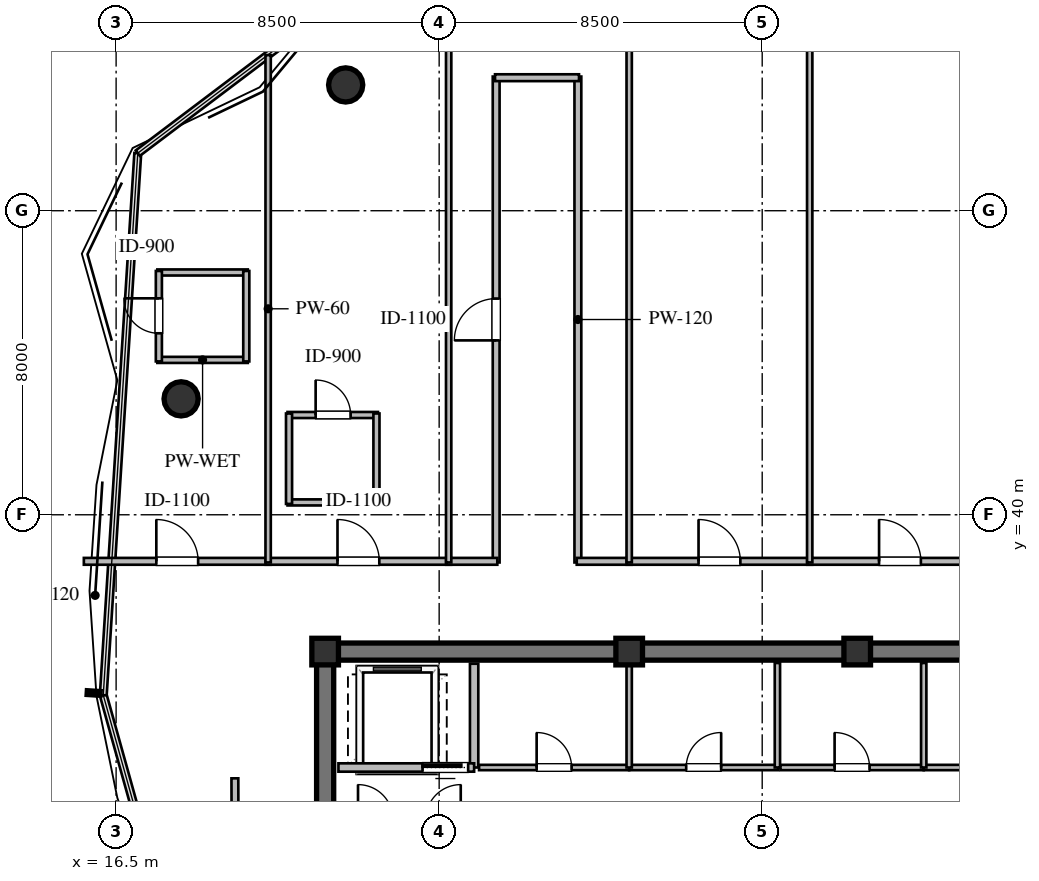
"""IFC4 building model, lengths in metres.
Left out: names, types, materials, properties, quantities, classifications, styles, units other than length and angle.
Written with IfcOpenShell. Run it as: python <this file> out.ifc"""

import sys

from ifc_helpers import new_model, si_unit, direction, frame, frame_2d, origin, origin_2d, place, context, subcontext, project, spatial, rectangle, circle, extrude, element, fill, save


model = new_model("IFC4")
c1 = context("Model", 3, precision=1e-05, world=origin(), true_north=direction((0.0, 1.0)))
c2 = subcontext(c1, "Body", "Model", "MODEL_VIEW")
j1 = project(units=[si_unit("LENGTHUNIT", "METRE"), si_unit("PLANEANGLEUNIT", "RADIAN")], contexts=[c1])
p1 = place(None, origin())
s1 = spatial("IfcSite", under=j1, at=p1, CompositionType="ELEMENT")
p2 = place(p1, origin())
s2 = spatial("IfcBuilding", under=s1, at=p2, CompositionType="ELEMENT")
p3 = place(p2, frame((0.0, 0.0, 262.4)))
s3 = spatial("IfcBuildingStorey", under=s2, at=p3, CompositionType="ELEMENT", Elevation=262.4)
p4 = place(p3, frame((21.775, 36.4, 0.0), z_axis=(0.0, 0.0, 1.0), x_axis=(1.0, 0.0, 0.0)))
e1 = element("IfcWall", 1, at=p4, inside=s3, PredefinedType="SHEAR", context=c2, shape_type="SweptSolid", body=[
    extrude(rectangle(XDim=22.45, YDim=0.45, at=frame_2d((11.225, 0.0))), origin(), (0.0, 0.0, 1.0), 3.56),
])
p5 = place(p3, frame((22.0, 23.825, 0.0), z_axis=(0.0, 0.0, 1.0), x_axis=(0.0, 1.0, 0.0)))
e2 = element("IfcWall", 2, at=p5, inside=s3, PredefinedType="SHEAR", context=c2, shape_type="SweptSolid", body=[
    extrude(rectangle(XDim=12.35, YDim=0.45, at=frame_2d((6.175, 0.0))), origin(), (0.0, 0.0, 1.0), 3.56),
])
for number, where, z_axis, x_axis in (
    (3, (36.0, 36.4, 0.0), (0.0, 0.0, 1.0), (1.0, 0.0, 0.0)),
    (4, (30.0, 36.4, 0.0), (0.0, 0.0, 1.0), (1.0, 0.0, 0.0)),
    (5, (22.0, 36.4, 0.0), (0.0, 0.0, 1.0), (1.0, 0.0, 0.0)),
):
    element("IfcColumn", number, at=place(p3, frame(where, z_axis=z_axis, x_axis=x_axis)), inside=s3, PredefinedType="COLUMN", context=c2, shape_type="SweptSolid", body=[
        extrude(rectangle(XDim=0.7, YDim=0.7, at=origin_2d()), origin(), (0.0, 0.0, 1.0), 3.8),
    ])
for number, where, z_axis, x_axis in (
    (6, (22.54, 51.31, 0.0), (0.0, 0.0, 1.0), (1.0, 0.0, 0.0)),
    (7, (18.21, 43.05, 0.0), (0.0, 0.0, 1.0), (1.0, 0.0, 0.0)),
):
    element("IfcColumn", number, at=place(p3, frame(where, z_axis=z_axis, x_axis=x_axis)), inside=s3, PredefinedType="COLUMN", context=c2, shape_type="SweptSolid", body=[
        extrude(circle(Radius=0.45, at=origin_2d()), origin(), (0.0, 0.0, 1.0), 3.8),
    ])
p6 = place(p3, frame((25.92, 33.35, 0.0), z_axis=(0.0, 0.0, 1.0), x_axis=(0.0, 1.0, 0.0)))
e8 = element("IfcWall", 8, at=p6, inside=s3, PredefinedType="SOLIDWALL", context=c2, shape_type="SweptSolid", body=[
    extrude(rectangle(XDim=2.73, YDim=0.22, at=frame_2d((1.365, 0.0))), origin(), (0.0, 0.0, 1.0), 3.56),
])
p7 = place(p3, frame((22.35, 33.35, 0.0), z_axis=(0.0, 0.0, 1.0), x_axis=(1.0, 0.0, 0.0)))
e9 = element("IfcWall", 9, at=p7, inside=s3, PredefinedType="SOLIDWALL", context=c2, shape_type="SweptSolid", body=[
    extrude(rectangle(XDim=3.57, YDim=0.22, at=frame_2d((1.785, 0.0))), origin(), (0.0, 0.0, 1.0), 3.56),
])
p8 = place(p7, frame((2.213, 0.0, 0.0)))
e10 = element("IfcOpeningElement", 10, at=p8, cuts=e9, PredefinedType="OPENING", context=c2, shape_type="SweptSolid", body=[
    extrude(rectangle(XDim=1.2, YDim=2.1, at=frame_2d((0.6, 1.05))), frame((0.0, 0.12, 0.0), z_axis=(0.0, -1.0, 0.0), x_axis=(1.0, 0.0, 0.0)), (0.0, 0.0, 1.0), 0.24),
])
p9 = place(p3, frame((26.05, 33.35, 0.0), z_axis=(0.0, 0.0, 1.0), x_axis=(1.0, 0.0, 0.0)))
e11 = element("IfcWall", 11, at=p9, inside=s3, PredefinedType="PARTITIONING", context=c2, shape_type="SweptSolid", body=[
    extrude(rectangle(XDim=3.95, YDim=0.14, at=frame_2d((1.975, 0.0))), origin(), (0.0, 0.0, 1.0), 3.56),
])
p10 = place(p9, frame((1.515, 0.0, 0.0)))
e12 = element("IfcOpeningElement", 12, at=p10, cuts=e11, PredefinedType="OPENING", context=c2, shape_type="SweptSolid", body=[
    extrude(rectangle(XDim=0.92, YDim=2.1, at=frame_2d((0.46, 1.05))), frame((0.0, 0.08, 0.0), z_axis=(0.0, -1.0, 0.0), x_axis=(1.0, 0.0, 0.0)), (0.0, 0.0, 1.0), 0.16),
])
p11 = place(p3, frame((30.0, 33.35, 0.0), z_axis=(0.0, 0.0, 1.0), x_axis=(1.0, 0.0, 0.0)))
e13 = element("IfcWall", 13, at=p11, inside=s3, PredefinedType="PARTITIONING", context=c2, shape_type="SweptSolid", body=[
    extrude(rectangle(XDim=3.92, YDim=0.14, at=frame_2d((1.96, 0.0))), origin(), (0.0, 0.0, 1.0), 3.56),
])
p12 = place(p11, frame((1.5, 0.0, 0.0)))
e14 = element("IfcOpeningElement", 14, at=p12, cuts=e13, PredefinedType="OPENING", context=c2, shape_type="SweptSolid", body=[
    extrude(rectangle(XDim=0.92, YDim=2.1, at=frame_2d((0.46, 1.05))), frame((0.0, 0.08, 0.0), z_axis=(0.0, -1.0, 0.0), x_axis=(1.0, 0.0, 0.0)), (0.0, 0.0, 1.0), 0.16),
])
for number, where, z_axis, x_axis in (
    (15, (30.0, 33.35, 0.0), (0.0, 0.0, 1.0), (0.0, 1.0, 0.0)),
    (16, (33.9, 33.35, 0.0), (0.0, 0.0, 1.0), (0.0, 1.0, 0.0)),
):
    element("IfcWall", number, at=place(p3, frame(where, z_axis=z_axis, x_axis=x_axis)), inside=s3, PredefinedType="PARTITIONING", context=c2, shape_type="SweptSolid", body=[
        extrude(rectangle(XDim=2.75, YDim=0.14, at=frame_2d((1.375, 0.0))), origin(), (0.0, 0.0, 1.0), 3.56),
    ])
p13 = place(p3, frame((33.98, 33.35, 0.0), z_axis=(0.0, 0.0, 1.0), x_axis=(1.0, 0.0, 0.0)))
e17 = element("IfcWall", 17, at=p13, inside=s3, PredefinedType="PARTITIONING", context=c2, shape_type="SweptSolid", body=[
    extrude(rectangle(XDim=3.77, YDim=0.14, at=frame_2d((1.885, 0.0))), origin(), (0.0, 0.0, 1.0), 3.56),
])
p14 = place(p13, frame((1.425, 0.0, 0.0)))
e18 = element("IfcOpeningElement", 18, at=p14, cuts=e17, PredefinedType="OPENING", context=c2, shape_type="SweptSolid", body=[
    extrude(rectangle(XDim=0.92, YDim=2.1, at=frame_2d((0.46, 1.05))), frame((0.0, 0.08, 0.0), z_axis=(0.0, -1.0, 0.0), x_axis=(1.0, 0.0, 0.0)), (0.0, 0.0, 1.0), 0.16),
])
p15 = place(p3, frame((37.75, 33.35, 0.0), z_axis=(0.0, 0.0, 1.0), x_axis=(1.0, 0.0, 0.0)))
e19 = element("IfcWall", 19, at=p15, inside=s3, PredefinedType="PARTITIONING", context=c2, shape_type="SweptSolid", body=[
    extrude(rectangle(XDim=3.77, YDim=0.14, at=frame_2d((1.885, 0.0))), origin(), (0.0, 0.0, 1.0), 3.56),
])
p16 = place(p15, frame((1.425, 0.0, 0.0)))
e20 = element("IfcOpeningElement", 20, at=p16, cuts=e19, PredefinedType="OPENING", context=c2, shape_type="SweptSolid", body=[
    extrude(rectangle(XDim=0.92, YDim=2.1, at=frame_2d((0.46, 1.05))), frame((0.0, 0.08, 0.0), z_axis=(0.0, -1.0, 0.0), x_axis=(1.0, 0.0, 0.0)), (0.0, 0.0, 1.0), 0.16),
])
p17 = place(p3, frame((37.75, 33.35, 0.0), z_axis=(0.0, 0.0, 1.0), x_axis=(0.0, 1.0, 0.0)))
e21 = element("IfcWall", 21, at=p17, inside=s3, PredefinedType="PARTITIONING", context=c2, shape_type="SweptSolid", body=[
    extrude(rectangle(XDim=2.75, YDim=0.14, at=frame_2d((1.375, 0.0))), origin(), (0.0, 0.0, 1.0), 3.56),
])
for number, where, z_axis, x_axis in (
    (22, (17.585, 44.075, 0.0), (0.0, 0.0, 1.0), (1.0, 0.0, 0.0)),
    (23, (17.585, 46.375, 0.0), (0.0, 0.0, 1.0), (1.0, 0.0, 0.0)),
):
    element("IfcWall", number, at=place(p3, frame(where, z_axis=z_axis, x_axis=x_axis)), inside=s3, PredefinedType="PLUMBINGWALL", context=c2, shape_type="SweptSolid", body=[
        extrude(rectangle(XDim=2.38, YDim=0.16, at=frame_2d((1.19, 0.0))), origin(), (0.0, 0.0, 1.0), 3.56),
    ])
p18 = place(p3, frame((17.625, 44.035, 0.0), z_axis=(0.0, 0.0, 1.0), x_axis=(0.0, 1.0, 0.0)))
e24 = element("IfcWall", 24, at=p18, inside=s3, PredefinedType="PLUMBINGWALL", context=c2, shape_type="SweptSolid", body=[
    extrude(rectangle(XDim=2.38, YDim=0.16, at=frame_2d((1.19, 0.0))), origin(), (0.0, 0.0, 1.0), 3.56),
])
p19 = place(p18, frame((0.74, 0.0, 0.0)))
e25 = element("IfcOpeningElement", 25, at=p19, cuts=e24, PredefinedType="OPENING", context=c2, shape_type="SweptSolid", body=[
    extrude(rectangle(XDim=0.92, YDim=2.1, at=frame_2d((0.46, 1.05))), frame((0.0, 0.09, 0.0), z_axis=(0.0, -1.0, 0.0), x_axis=(1.0, 0.0, 0.0)), (0.0, 0.0, 1.0), 0.18),
])
p20 = place(p3, frame((19.925, 44.035, 0.0), z_axis=(0.0, 0.0, 1.0), x_axis=(0.0, 1.0, 0.0)))
e26 = element("IfcWall", 26, at=p20, inside=s3, PredefinedType="PLUMBINGWALL", context=c2, shape_type="SweptSolid", body=[
    extrude(rectangle(XDim=2.38, YDim=0.16, at=frame_2d((1.19, 0.0))), origin(), (0.0, 0.0, 1.0), 3.56),
])
p21 = place(p3, frame((21.01, 40.325, 0.0), z_axis=(0.0, 0.0, 1.0), x_axis=(1.0, 0.0, 0.0)))
e27 = element("IfcWall", 27, at=p21, inside=s3, PredefinedType="PLUMBINGWALL", context=c2, shape_type="SweptSolid", body=[
    extrude(rectangle(XDim=2.38, YDim=0.16, at=frame_2d((1.19, 0.0))), origin(), (0.0, 0.0, 1.0), 3.56),
])
p22 = place(p3, frame((21.01, 42.625, 0.0), z_axis=(0.0, 0.0, 1.0), x_axis=(1.0, 0.0, 0.0)))
e28 = element("IfcWall", 28, at=p22, inside=s3, PredefinedType="PLUMBINGWALL", context=c2, shape_type="SweptSolid", body=[
    extrude(rectangle(XDim=2.38, YDim=0.16, at=frame_2d((1.19, 0.0))), origin(), (0.0, 0.0, 1.0), 3.56),
])
p23 = place(p22, frame((0.74, 0.0, 0.0)))
e29 = element("IfcOpeningElement", 29, at=p23, cuts=e28, PredefinedType="OPENING", context=c2, shape_type="SweptSolid", body=[
    extrude(rectangle(XDim=0.92, YDim=2.1, at=frame_2d((0.46, 1.05))), frame((0.0, 0.09, 0.0), z_axis=(0.0, -1.0, 0.0), x_axis=(1.0, 0.0, 0.0)), (0.0, 0.0, 1.0), 0.18),
])
p24 = place(p3, frame((21.05, 40.285, 0.0), z_axis=(0.0, 0.0, 1.0), x_axis=(0.0, 1.0, 0.0)))
e30 = element("IfcWall", 30, at=p24, inside=s3, PredefinedType="PLUMBINGWALL", context=c2, shape_type="SweptSolid", body=[
    extrude(rectangle(XDim=2.38, YDim=0.16, at=frame_2d((1.19, 0.0))), origin(), (0.0, 0.0, 1.0), 3.56),
])
p25 = place(p3, frame((23.35, 40.285, 0.0), z_axis=(0.0, 0.0, 1.0), x_axis=(0.0, 1.0, 0.0)))
e31 = element("IfcWall", 31, at=p25, inside=s3, PredefinedType="PLUMBINGWALL", context=c2, shape_type="SweptSolid", body=[
    extrude(rectangle(XDim=2.38, YDim=0.16, at=frame_2d((1.19, 0.0))), origin(), (0.0, 0.0, 1.0), 3.09),
])
p26 = place(p3, frame((15.651, 38.775, 0.0), z_axis=(0.0, 0.0, 1.0), x_axis=(1.0, 0.0, 0.0)))
e32 = element("IfcWall", 32, at=p26, inside=s3, PredefinedType="PARTITIONING", context=c2, shape_type="SweptSolid", body=[
    extrude(rectangle(XDim=4.914, YDim=0.18, at=frame_2d((2.457, 0.0))), origin(), (0.0, 0.0, 1.0), 3.56),
])
p27 = place(p26, frame((1.907, 0.0, 0.0)))
e33 = element("IfcOpeningElement", 33, at=p27, cuts=e32, PredefinedType="OPENING", context=c2, shape_type="SweptSolid", body=[
    extrude(rectangle(XDim=1.1, YDim=2.1, at=frame_2d((0.55, 1.05))), frame((0.0, 0.1, 0.0), z_axis=(0.0, -1.0, 0.0), x_axis=(1.0, 0.0, 0.0)), (0.0, 0.0, 1.0), 0.2),
])
p28 = place(p3, frame((20.435, 38.775, 0.0), z_axis=(0.0, 0.0, 1.0), x_axis=(1.0, 0.0, 0.0)))
e34 = element("IfcWall", 34, at=p28, inside=s3, PredefinedType="PARTITIONING", context=c2, shape_type="SweptSolid", body=[
    extrude(rectangle(XDim=4.88, YDim=0.18, at=frame_2d((2.44, 0.0))), origin(), (0.0, 0.0, 1.0), 3.56),
])
p29 = place(p28, frame((1.89, 0.0, 0.0)))
e35 = element("IfcOpeningElement", 35, at=p29, cuts=e34, PredefinedType="OPENING", context=c2, shape_type="SweptSolid", body=[
    extrude(rectangle(XDim=1.1, YDim=2.1, at=frame_2d((0.55, 1.05))), frame((0.0, 0.1, 0.0), z_axis=(0.0, -1.0, 0.0), x_axis=(1.0, 0.0, 0.0)), (0.0, 0.0, 1.0), 0.2),
])
p30 = place(p3, frame((26.5, 38.745, 0.0), z_axis=(0.0, 0.0, 1.0), x_axis=(0.0, 1.0, 0.0)))
e36 = element("IfcWall", 36, at=p30, inside=s3, PredefinedType="PARTITIONING", context=c2, shape_type="SweptSolid", body=[
    extrude(rectangle(XDim=12.785, YDim=0.18, at=frame_2d((6.393, 0.0))), origin(), (0.0, 0.0, 1.0), 3.56),
])
p31 = place(p30, frame((5.843, 0.0, 0.0)))
e37 = element("IfcOpeningElement", 37, at=p31, cuts=e36, PredefinedType="OPENING", context=c2, shape_type="SweptSolid", body=[
    extrude(rectangle(XDim=1.1, YDim=2.1, at=frame_2d((0.55, 1.05))), frame((0.0, 0.1, 0.0), z_axis=(0.0, -1.0, 0.0), x_axis=(1.0, 0.0, 0.0)), (0.0, 0.0, 1.0), 0.2),
])
p32 = place(p3, frame((28.65, 51.53, 0.0), z_axis=(0.0, 0.0, 1.0), x_axis=(0.0, -1.0, 0.0)))
e38 = element("IfcWall", 38, at=p32, inside=s3, PredefinedType="PARTITIONING", context=c2, shape_type="SweptSolid", body=[
    extrude(rectangle(XDim=12.785, YDim=0.18, at=frame_2d((6.393, 0.0))), origin(), (0.0, 0.0, 1.0), 3.56),
])
p33 = place(p3, frame((26.47, 51.5, 0.0), z_axis=(0.0, 0.0, 1.0), x_axis=(1.0, 0.0, 0.0)))
e39 = element("IfcWall", 39, at=p33, inside=s3, PredefinedType="PARTITIONING", context=c2, shape_type="SweptSolid", body=[
    extrude(rectangle(XDim=2.21, YDim=0.18, at=frame_2d((1.105, 0.0))), origin(), (0.0, 0.0, 1.0), 3.56),
])
p34 = place(p3, frame((28.62, 38.775, 0.0), z_axis=(0.0, 0.0, 1.0), x_axis=(1.0, 0.0, 0.0)))
e40 = element("IfcWall", 40, at=p34, inside=s3, PredefinedType="PARTITIONING", context=c2, shape_type="SweptSolid", body=[
    extrude(rectangle(XDim=1.445, YDim=0.18, at=frame_2d((0.722, 0.0))), origin(), (0.0, 0.0, 1.0), 3.56),
])
p35 = place(p3, frame((25.185, 38.775, 0.0), z_axis=(0.0, 0.0, 1.0), x_axis=(1.0, 0.0, 0.0)))
e41 = element("IfcWall", 41, at=p35, inside=s3, PredefinedType="PARTITIONING", context=c2, shape_type="SweptSolid", body=[
    extrude(rectangle(XDim=1.345, YDim=0.18, at=frame_2d((0.672, 0.0))), origin(), (0.0, 0.0, 1.0), 3.56),
])
p36 = place(p3, frame((29.935, 38.775, 0.0), z_axis=(0.0, 0.0, 1.0), x_axis=(1.0, 0.0, 0.0)))
e42 = element("IfcWall", 42, at=p36, inside=s3, PredefinedType="PARTITIONING", context=c2, shape_type="SweptSolid", body=[
    extrude(rectangle(XDim=4.88, YDim=0.18, at=frame_2d((2.44, 0.0))), origin(), (0.0, 0.0, 1.0), 3.56),
])
p37 = place(p36, frame((1.89, 0.0, 0.0)))
e43 = element("IfcOpeningElement", 43, at=p37, cuts=e42, PredefinedType="OPENING", context=c2, shape_type="SweptSolid", body=[
    extrude(rectangle(XDim=1.1, YDim=2.1, at=frame_2d((0.55, 1.05))), frame((0.0, 0.1, 0.0), z_axis=(0.0, -1.0, 0.0), x_axis=(1.0, 0.0, 0.0)), (0.0, 0.0, 1.0), 0.2),
])
p38 = place(p3, frame((34.685, 38.775, 0.0), z_axis=(0.0, 0.0, 1.0), x_axis=(1.0, 0.0, 0.0)))
e44 = element("IfcWall", 44, at=p38, inside=s3, PredefinedType="PARTITIONING", context=c2, shape_type="SweptSolid", body=[
    extrude(rectangle(XDim=4.88, YDim=0.18, at=frame_2d((2.44, 0.0))), origin(), (0.0, 0.0, 1.0), 3.56),
])
p39 = place(p38, frame((1.89, 0.0, 0.0)))
e45 = element("IfcOpeningElement", 45, at=p39, cuts=e44, PredefinedType="OPENING", context=c2, shape_type="SweptSolid", body=[
    extrude(rectangle(XDim=1.1, YDim=2.1, at=frame_2d((0.55, 1.05))), frame((0.0, 0.1, 0.0), z_axis=(0.0, -1.0, 0.0), x_axis=(1.0, 0.0, 0.0)), (0.0, 0.0, 1.0), 0.2),
])
p40 = place(p3, frame((19.647, 26.281, 0.0), z_axis=(0.0, 0.0, 1.0), x_axis=(-0.003238907688, 0.999994754725, 0.0)))
e46 = element("IfcWall", 46, at=p40, inside=s3, PredefinedType="PARTITIONING", context=c2, shape_type="SweptSolid", body=[
    extrude(rectangle(XDim=6.784, YDim=0.18, at=frame_2d((3.392, 0.0))), origin(), (0.0, 0.0, 1.0), 3.017),
])
p41 = place(p40, frame((2.842, 0.0, 0.0)))
e47 = element("IfcOpeningElement", 47, at=p41, cuts=e46, PredefinedType="OPENING", context=c2, shape_type="SweptSolid", body=[
    extrude(rectangle(XDim=1.1, YDim=2.1, at=frame_2d((0.55, 1.05))), frame((0.0, 0.1, 0.0), z_axis=(0.0, -1.0, 0.0), x_axis=(1.0, 0.0, 0.0)), (0.0, 0.0, 1.0), 0.2),
])
p42 = place(p3, frame((20.5, 52.094, 0.0), z_axis=(0.0, 0.0, 1.0), x_axis=(0.0, -1.0, 0.0)))
e48 = element("IfcWall", 48, at=p42, inside=s3, PredefinedType="PARTITIONING", context=c2, shape_type="SweptSolid", body=[
    extrude(rectangle(XDim=13.349, YDim=0.14, at=frame_2d((6.675, 0.0))), origin(), (0.0, 0.0, 1.0), 3.56),
])
p43 = place(p3, frame((25.25, 58.892, 0.0), z_axis=(0.0, 0.0, 1.0), x_axis=(0.0, -1.0, 0.0)))
e49 = element("IfcWall", 49, at=p43, inside=s3, PredefinedType="PARTITIONING", context=c2, shape_type="SweptSolid", body=[
    extrude(rectangle(XDim=20.147, YDim=0.14, at=frame_2d((10.073, 0.0))), origin(), (0.0, 0.0, 1.0), 3.09),
])
p44 = place(p3, frame((30.0, 59.016, 0.0), z_axis=(0.0, 0.0, 1.0), x_axis=(0.0, -1.0, 0.0)))
e50 = element("IfcWall", 50, at=p44, inside=s3, PredefinedType="PARTITIONING", context=c2, shape_type="SweptSolid", body=[
    extrude(rectangle(XDim=20.271, YDim=0.14, at=frame_2d((10.135, 0.0))), origin(), (0.0, 0.0, 1.0), 3.56),
])
p45 = place(p3, frame((34.75, 63.486, 0.0), z_axis=(0.0, 0.0, 1.0), x_axis=(0.0, -1.0, 0.0)))
e51 = element("IfcWall", 51, at=p45, inside=s3, PredefinedType="PARTITIONING", context=c2, shape_type="SweptSolid", body=[
    extrude(rectangle(XDim=24.741, YDim=0.14, at=frame_2d((12.371, 0.0))), origin(), (0.0, 0.0, 1.0), 3.09),
])
p46 = place(p8, origin())
e52 = element("IfcDoor", 52, at=p46, inside=s3, OperationType="SLIDING_TO_LEFT", PredefinedType="DOOR", context=c2, shape_type="SweptSolid", body=[
    extrude(rectangle(XDim=1.2, YDim=2.1, at=frame_2d((0.6, 1.05))), frame((0.0, 0.025, 0.0), z_axis=(0.0, -1.0, 0.0), x_axis=(1.0, 0.0, 0.0)), (0.0, 0.0, 1.0), 0.05),
])
fill(e10, e52)
p47 = place(p10, origin())
e53 = element("IfcDoor", 53, at=p47, inside=s3, OperationType="SINGLE_SWING_LEFT", PredefinedType="DOOR", context=c2, shape_type="SweptSolid", body=[
    extrude(rectangle(XDim=0.92, YDim=2.1, at=frame_2d((0.46, 1.05))), frame((0.0, 0.025, 0.0), z_axis=(0.0, -1.0, 0.0), x_axis=(1.0, 0.0, 0.0)), (0.0, 0.0, 1.0), 0.05),
])
fill(e12, e53)
p48 = place(p12, origin())
e54 = element("IfcDoor", 54, at=p48, inside=s3, OperationType="SINGLE_SWING_RIGHT", PredefinedType="DOOR", context=c2, shape_type="SweptSolid", body=[
    extrude(rectangle(XDim=0.92, YDim=2.1, at=frame_2d((0.46, 1.05))), frame((0.0, 0.025, 0.0), z_axis=(0.0, -1.0, 0.0), x_axis=(1.0, 0.0, 0.0)), (0.0, 0.0, 1.0), 0.05),
])
fill(e14, e54)
p49 = place(p14, origin())
e55 = element("IfcDoor", 55, at=p49, inside=s3, OperationType="SINGLE_SWING_LEFT", PredefinedType="DOOR", context=c2, shape_type="SweptSolid", body=[
    extrude(rectangle(XDim=0.92, YDim=2.1, at=frame_2d((0.46, 1.05))), frame((0.0, 0.025, 0.0), z_axis=(0.0, -1.0, 0.0), x_axis=(1.0, 0.0, 0.0)), (0.0, 0.0, 1.0), 0.05),
])
fill(e18, e55)
p50 = place(p19, origin())
e56 = element("IfcDoor", 56, at=p50, inside=s3, OperationType="SINGLE_SWING_RIGHT", PredefinedType="DOOR", context=c2, shape_type="SweptSolid", body=[
    extrude(rectangle(XDim=0.92, YDim=2.1, at=frame_2d((0.46, 1.05))), frame((0.0, 0.025, 0.0), z_axis=(0.0, -1.0, 0.0), x_axis=(1.0, 0.0, 0.0)), (0.0, 0.0, 1.0), 0.05),
])
fill(e25, e56)
p51 = place(p23, origin())
e57 = element("IfcDoor", 57, at=p51, inside=s3, OperationType="SINGLE_SWING_LEFT", PredefinedType="DOOR", context=c2, shape_type="SweptSolid", body=[
    extrude(rectangle(XDim=0.92, YDim=2.1, at=frame_2d((0.46, 1.05))), frame((0.0, 0.025, 0.0), z_axis=(0.0, -1.0, 0.0), x_axis=(1.0, 0.0, 0.0)), (0.0, 0.0, 1.0), 0.05),
])
fill(e29, e57)
p52 = place(p27, origin())
e58 = element("IfcDoor", 58, at=p52, inside=s3, OperationType="SINGLE_SWING_LEFT", PredefinedType="DOOR", context=c2, shape_type="SweptSolid", body=[
    extrude(rectangle(XDim=1.1, YDim=2.1, at=frame_2d((0.55, 1.05))), frame((0.0, 0.025, 0.0), z_axis=(0.0, -1.0, 0.0), x_axis=(1.0, 0.0, 0.0)), (0.0, 0.0, 1.0), 0.05),
])
fill(e33, e58)
p53 = place(p29, origin())
e59 = element("IfcDoor", 59, at=p53, inside=s3, OperationType="SINGLE_SWING_LEFT", PredefinedType="DOOR", context=c2, shape_type="SweptSolid", body=[
    extrude(rectangle(XDim=1.1, YDim=2.1, at=frame_2d((0.55, 1.05))), frame((0.0, 0.025, 0.0), z_axis=(0.0, -1.0, 0.0), x_axis=(1.0, 0.0, 0.0)), (0.0, 0.0, 1.0), 0.05),
])
fill(e35, e59)
p54 = place(p31, origin())
e60 = element("IfcDoor", 60, at=p54, inside=s3, OperationType="SINGLE_SWING_LEFT", PredefinedType="DOOR", context=c2, shape_type="SweptSolid", body=[
    extrude(rectangle(XDim=1.1, YDim=2.1, at=frame_2d((0.55, 1.05))), frame((0.0, 0.025, 0.0), z_axis=(0.0, -1.0, 0.0), x_axis=(1.0, 0.0, 0.0)), (0.0, 0.0, 1.0), 0.05),
])
fill(e37, e60)
p55 = place(p37, origin())
e61 = element("IfcDoor", 61, at=p55, inside=s3, OperationType="SINGLE_SWING_LEFT", PredefinedType="DOOR", context=c2, shape_type="SweptSolid", body=[
    extrude(rectangle(XDim=1.1, YDim=2.1, at=frame_2d((0.55, 1.05))), frame((0.0, 0.025, 0.0), z_axis=(0.0, -1.0, 0.0), x_axis=(1.0, 0.0, 0.0)), (0.0, 0.0, 1.0), 0.05),
])
fill(e43, e61)
p56 = place(p39, origin())
e62 = element("IfcDoor", 62, at=p56, inside=s3, OperationType="SINGLE_SWING_LEFT", PredefinedType="DOOR", context=c2, shape_type="SweptSolid", body=[
    extrude(rectangle(XDim=1.1, YDim=2.1, at=frame_2d((0.55, 1.05))), frame((0.0, 0.025, 0.0), z_axis=(0.0, -1.0, 0.0), x_axis=(1.0, 0.0, 0.0)), (0.0, 0.0, 1.0), 0.05),
])
fill(e45, e62)
save(model, sys.argv[1])
